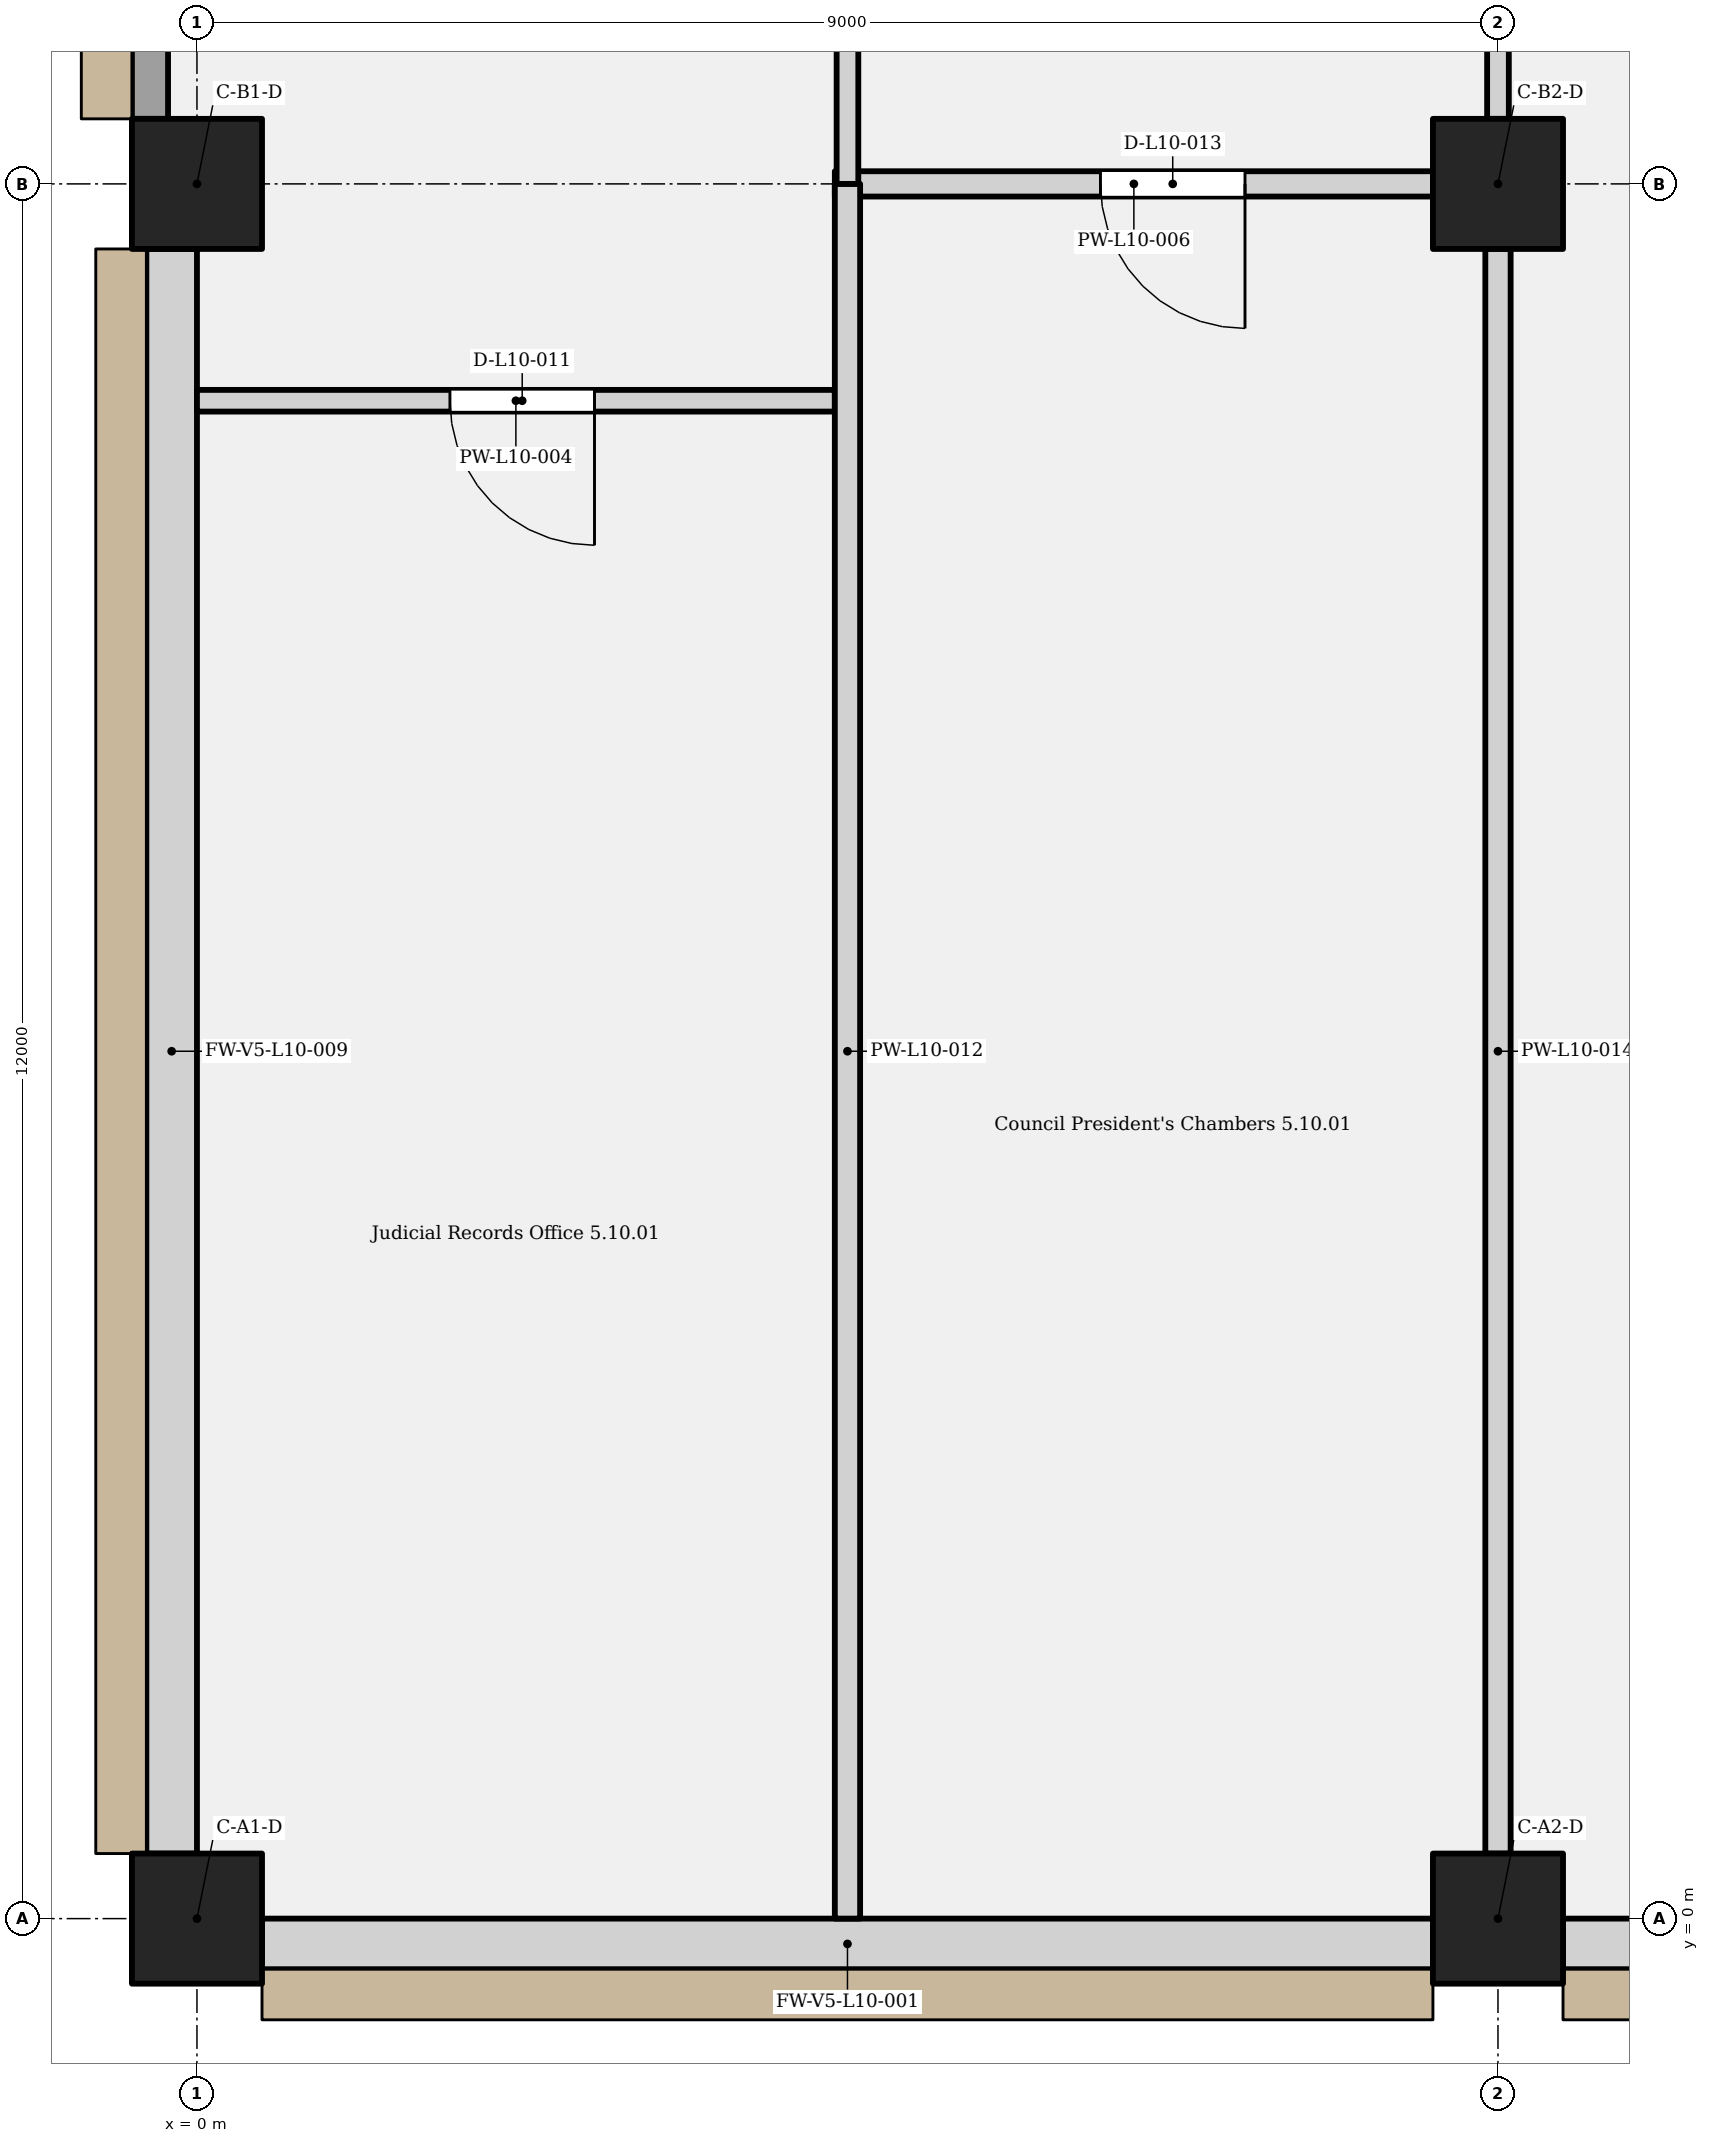
"""IFC4 building model, lengths in metres.
Left out: names, types, materials, properties, quantities, classifications, styles, units other than length and angle.
Written with IfcOpenShell. Run it as: python <this file> out.ifc"""

import sys

from ifc_helpers import new_model, si_unit, direction, frame, frame_2d, origin, origin_2d, place, context, subcontext, project, spatial, rectangle, extrude, element, fill, save


model = new_model("IFC4")
c1 = context("Model", 3, precision=1e-05, world=origin(), true_north=direction((0.0, 1.0)))
c2 = subcontext(c1, "Body", "Model", "MODEL_VIEW")
j1 = project(units=[si_unit("LENGTHUNIT", "METRE"), si_unit("PLANEANGLEUNIT", "RADIAN")], contexts=[c1])
p1 = place(None, origin())
s1 = spatial("IfcSite", under=j1, at=p1, CompositionType="ELEMENT")
p2 = place(p1, origin())
s2 = spatial("IfcBuilding", under=s1, at=p2, CompositionType="ELEMENT")
p3 = place(p2, frame((0.0, 0.0, 53.4)))
s3 = spatial("IfcBuildingStorey", under=s2, at=p3, CompositionType="ELEMENT", Elevation=53.4)
for number, where, z_axis, x_axis in (
    (1, (0.0, 0.0, 0.0), (0.0, 0.0, 1.0), (1.0, 0.0, 0.0)),
    (2, (9.0, 0.0, 0.0), (0.0, 0.0, 1.0), (1.0, 0.0, 0.0)),
    (3, (0.0, 12.0, 0.0), (0.0, 0.0, 1.0), (1.0, 0.0, 0.0)),
    (4, (9.0, 12.0, 0.0), (0.0, 0.0, 1.0), (1.0, 0.0, 0.0)),
):
    element("IfcColumn", number, at=place(p3, frame(where, z_axis=z_axis, x_axis=x_axis)), inside=s3, PredefinedType="COLUMN", context=c2, shape_type="SweptSolid", body=[
        extrude(rectangle(XDim=0.9, YDim=0.9, at=origin_2d()), origin(), (0.0, 0.0, 1.0), 4.5),
    ])
for number, where, z_axis, x_axis in (
    (5, (0.45, -0.175, 0.0), (0.0, 0.0, 1.0), (1.0, 0.0, 0.0)),
    (6, (9.45, -0.175, 0.0), (0.0, 0.0, 1.0), (1.0, 0.0, 0.0)),
):
    element("IfcWall", number, at=place(p3, frame(where, z_axis=z_axis, x_axis=x_axis)), inside=s3, PredefinedType="SOLIDWALL", context=c2, shape_type="SweptSolid", body=[
        extrude(rectangle(XDim=8.1, YDim=0.35, at=frame_2d((4.05, 0.0))), origin(), (0.0, 0.0, 1.0), 4.25),
    ])
p4 = place(p3, frame((-0.175, 0.45, 0.0), z_axis=(0.0, 0.0, 1.0), x_axis=(0.0, 1.0, 0.0)))
e7 = element("IfcWall", 7, at=p4, inside=s3, PredefinedType="SOLIDWALL", context=c2, shape_type="SweptSolid", body=[
    extrude(rectangle(XDim=11.1, YDim=0.35, at=frame_2d((5.55, 0.0))), origin(), (0.0, 0.0, 1.0), 4.25),
])
p5 = place(p3, frame((-0.325, 12.45, 0.0), z_axis=(0.0, 0.0, 1.0), x_axis=(0.0, 1.0, 0.0)))
e8 = element("IfcWall", 8, at=p5, inside=s3, PredefinedType="SOLIDWALL", context=c2, shape_type="SweptSolid", body=[
    extrude(rectangle(XDim=15.6, YDim=0.25, at=frame_2d((7.8, 0.0))), origin(), (0.0, 0.0, 1.0), 4.25),
])
p6 = place(p3, frame((0.0, 10.5, 0.0), z_axis=(0.0, 0.0, 1.0), x_axis=(1.0, 0.0, 0.0)))
e9 = element("IfcWall", 9, at=p6, inside=s3, PredefinedType="PARTITIONING", context=c2, shape_type="SweptSolid", body=[
    extrude(rectangle(XDim=4.413, YDim=0.15, at=frame_2d((2.206, 0.0))), origin(), (0.0, 0.0, 1.0), 4.25),
])
p7 = place(p6, frame((2.75, 0.0, 0.0), z_axis=(0.0, 0.0, 1.0), x_axis=(-1.0, 0.0, 0.0)))
e10 = element("IfcOpeningElement", 10, at=p7, cuts=e9, PredefinedType="OPENING", context=c2, shape_type="SweptSolid", body=[
    extrude(rectangle(XDim=1.0, YDim=2.1, at=frame_2d((0.5, 1.05))), frame((0.0, 0.085, 0.0), z_axis=(0.0, -1.0, 0.0), x_axis=(1.0, 0.0, 0.0)), (0.0, 0.0, 1.0), 0.17),
])
p8 = place(p3, frame((4.413, 12.0, 0.0), z_axis=(0.0, 0.0, 1.0), x_axis=(1.0, 0.0, 0.0)))
e11 = element("IfcWall", 11, at=p8, inside=s3, PredefinedType="PARTITIONING", context=c2, shape_type="SweptSolid", body=[
    extrude(rectangle(XDim=4.137, YDim=0.175, at=frame_2d((2.069, 0.0))), origin(), (0.0, 0.0, 1.0), 3.5),
])
p9 = place(p8, frame((2.837, 0.0, 0.0), z_axis=(0.0, 0.0, 1.0), x_axis=(-1.0, 0.0, 0.0)))
e12 = element("IfcOpeningElement", 12, at=p9, cuts=e11, PredefinedType="OPENING", context=c2, shape_type="SweptSolid", body=[
    extrude(rectangle(XDim=1.0, YDim=2.1, at=frame_2d((0.5, 1.05))), frame((0.0, 0.097, 0.0), z_axis=(0.0, -1.0, 0.0), x_axis=(1.0, 0.0, 0.0)), (0.0, 0.0, 1.0), 0.195),
])
p10 = place(p3, frame((4.5, 0.0, 0.0), z_axis=(0.0, 0.0, 1.0), x_axis=(0.0, 1.0, 0.0)))
e13 = element("IfcWall", 13, at=p10, inside=s3, PredefinedType="PARTITIONING", context=c2, shape_type="SweptSolid", body=[
    extrude(rectangle(XDim=12.0, YDim=0.175, at=frame_2d((6.0, 0.0))), origin(), (0.0, 0.0, 1.0), 4.25),
])
p11 = place(p3, frame((4.5, 12.0, 0.0), z_axis=(0.0, 0.0, 1.0), x_axis=(0.0, 1.0, 0.0)))
e14 = element("IfcWall", 14, at=p11, inside=s3, PredefinedType="PARTITIONING", context=c2, shape_type="SweptSolid", body=[
    extrude(rectangle(XDim=5.025, YDim=0.15, at=frame_2d((2.512, 0.0))), origin(), (0.0, 0.0, 1.0), 4.25),
])
p12 = place(p3, frame((9.0, 0.45, 0.0), z_axis=(0.0, 0.0, 1.0), x_axis=(0.0, 1.0, 0.0)))
e15 = element("IfcWall", 15, at=p12, inside=s3, PredefinedType="PARTITIONING", context=c2, shape_type="SweptSolid", body=[
    extrude(rectangle(XDim=11.1, YDim=0.175, at=frame_2d((5.55, 0.0))), origin(), (0.0, 0.0, 1.0), 3.5),
])
p13 = place(p3, frame((9.0, 12.45, 0.0), z_axis=(0.0, 0.0, 1.0), x_axis=(0.0, 1.0, 0.0)))
e16 = element("IfcWall", 16, at=p13, inside=s3, PredefinedType="PARTITIONING", context=c2, shape_type="SweptSolid", body=[
    extrude(rectangle(XDim=4.575, YDim=0.15, at=frame_2d((2.288, 0.0))), origin(), (0.0, 0.0, 1.0), 3.3),
])
p14 = place(p7, origin())
e17 = element("IfcDoor", 17, at=p14, inside=s3, OperationType="SINGLE_SWING_LEFT", PredefinedType="DOOR", context=c2, shape_type="SweptSolid", body=[
    extrude(rectangle(XDim=1.0, YDim=2.1, at=frame_2d((0.5, 1.05))), frame((0.0, 0.025, 0.0), z_axis=(0.0, -1.0, 0.0), x_axis=(1.0, 0.0, 0.0)), (0.0, 0.0, 1.0), 0.05),
])
fill(e10, e17)
p15 = place(p9, origin())
e18 = element("IfcDoor", 18, at=p15, inside=s3, OperationType="SINGLE_SWING_LEFT", PredefinedType="DOOR", context=c2, shape_type="SweptSolid", body=[
    extrude(rectangle(XDim=1.0, YDim=2.1, at=frame_2d((0.5, 1.05))), frame((0.0, 0.025, 0.0), z_axis=(0.0, -1.0, 0.0), x_axis=(1.0, 0.0, 0.0)), (0.0, 0.0, 1.0), 0.05),
])
fill(e12, e18)
save(model, sys.argv[1])
